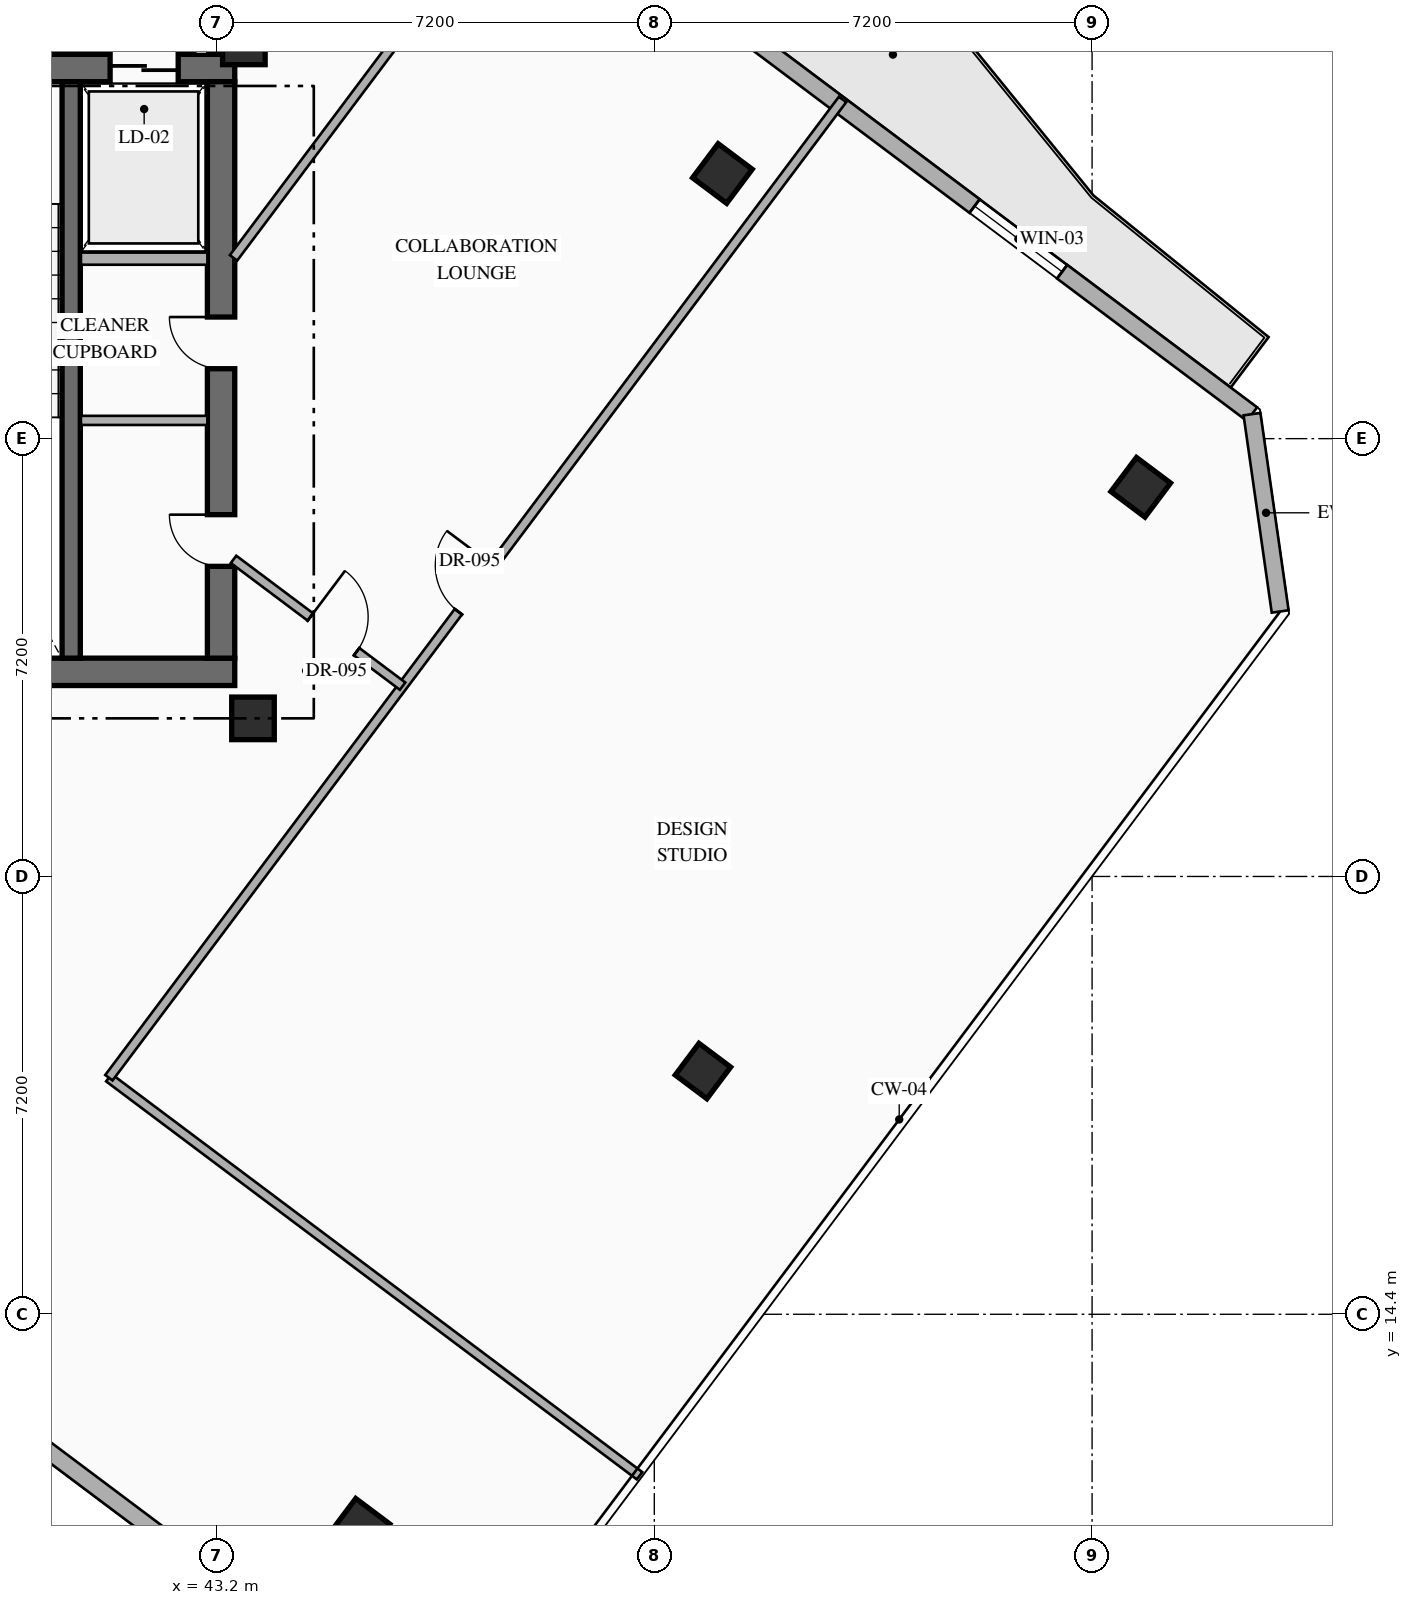
"""IFC4 building model, lengths in metres.
Left out: names, types, materials, properties, quantities, classifications, styles, units other than length and angle.
Written with IfcOpenShell. Run it as: python <this file> out.ifc"""

import sys

from ifc_helpers import new_model, si_unit, direction, frame, frame_2d, origin, origin_2d, place, context, subcontext, project, spatial, rectangle, hollow_rectangle, extrude, element, fill, save


model = new_model("IFC4")
c1 = context("Model", 3, precision=1e-05, world=origin(), true_north=direction((0.0, 1.0)))
c2 = subcontext(c1, "Body", "Model", "MODEL_VIEW")
j1 = project(units=[si_unit("LENGTHUNIT", "METRE"), si_unit("PLANEANGLEUNIT", "RADIAN")], contexts=[c1])
p1 = place(None, origin())
s1 = spatial("IfcSite", under=j1, at=p1, CompositionType="ELEMENT")
p2 = place(p1, origin())
s2 = spatial("IfcBuilding", under=s1, at=p2, CompositionType="ELEMENT")
p3 = place(p2, frame((0.0, 0.0, 220.35)))
s3 = spatial("IfcBuildingStorey", under=s2, at=p3, CompositionType="ELEMENT", Elevation=220.35)
p4 = place(p3, frame((36.04, 24.965, 0.0), z_axis=(0.0, 0.0, 1.0), x_axis=(1.0, 0.0, 0.0)))
e1 = element("IfcWall", 1, at=p4, inside=s3, PredefinedType="SHEAR", context=c2, shape_type="SweptSolid", body=[
    extrude(rectangle(XDim=7.46, YDim=0.45, at=frame_2d((3.73, 0.0))), origin(), (0.0, 0.0, 1.0), 3.6),
])
p5 = place(p3, frame((36.04, 34.895, 0.0), z_axis=(0.0, 0.0, 1.0), x_axis=(1.0, 0.0, 0.0)))
e2 = element("IfcWall", 2, at=p5, inside=s3, PredefinedType="SHEAR", context=c2, shape_type="SweptSolid", body=[
    extrude(rectangle(XDim=7.46, YDim=0.45, at=frame_2d((3.73, 0.0))), origin(), (0.0, 0.0, 1.0), 3.6),
])
p6 = place(p5, frame((2.51, 0.0, 0.0)))
e3 = element("IfcOpeningElement", 3, at=p6, cuts=e2, PredefinedType="OPENING", context=c2, shape_type="SweptSolid", body=[
    extrude(rectangle(XDim=1.1, YDim=2.2, at=frame_2d((0.55, 1.1))), frame((0.0, 0.235, 0.0), z_axis=(0.0, -1.0, 0.0), x_axis=(1.0, 0.0, 0.0)), (0.0, 0.0, 1.0), 0.47),
])
p7 = place(p5, frame((5.41, 0.0, 0.0)))
e4 = element("IfcOpeningElement", 4, at=p7, cuts=e2, PredefinedType="OPENING", context=c2, shape_type="SweptSolid", body=[
    extrude(rectangle(XDim=1.12, YDim=2.15, at=frame_2d((0.56, 1.075))), frame((0.0, 0.235, 0.0), z_axis=(0.0, -1.0, 0.0), x_axis=(1.0, 0.0, 0.0)), (0.0, 0.0, 1.0), 0.47),
])
p8 = place(p3, frame((43.275, 25.19, 0.0), z_axis=(0.0, 0.0, 1.0), x_axis=(0.0, 1.0, 0.0)))
e5 = element("IfcWall", 5, at=p8, inside=s3, PredefinedType="SHEAR", context=c2, shape_type="SweptSolid", body=[
    extrude(rectangle(XDim=9.48, YDim=0.45, at=frame_2d((4.74, 0.0))), origin(), (0.0, 0.0, 1.0), 3.6),
])
p9 = place(p8, frame((1.51, 0.0, 0.0)))
e6 = element("IfcOpeningElement", 6, at=p9, cuts=e5, PredefinedType="OPENING", context=c2, shape_type="SweptSolid", body=[
    extrude(rectangle(XDim=0.85, YDim=2.08, at=frame_2d((0.425, 1.04))), frame((0.0, 0.235, 0.0), z_axis=(0.0, -1.0, 0.0), x_axis=(1.0, 0.0, 0.0)), (0.0, 0.0, 1.0), 0.47),
])
p10 = place(p8, frame((4.76, 0.0, 0.0)))
e7 = element("IfcOpeningElement", 7, at=p10, cuts=e5, PredefinedType="OPENING", context=c2, shape_type="SweptSolid", body=[
    extrude(rectangle(XDim=0.85, YDim=2.08, at=frame_2d((0.425, 1.04))), frame((0.0, 0.235, 0.0), z_axis=(0.0, -1.0, 0.0), x_axis=(1.0, 0.0, 0.0)), (0.0, 0.0, 1.0), 0.47),
])
p11 = place(p3, frame((40.81, 25.19, 0.0), z_axis=(0.0, 0.0, 1.0), x_axis=(0.0, 1.0, 0.0)))
e8 = element("IfcWall", 8, at=p11, inside=s3, PredefinedType="SHEAR", context=c2, shape_type="SweptSolid", body=[
    extrude(rectangle(XDim=9.48, YDim=0.3, at=frame_2d((4.74, 0.0))), origin(), (0.0, 0.0, 1.0), 3.6),
])
for number, where, z_axis, x_axis in (
    (9, (43.8, 24.2, 0.0), (0.0, 0.0, 1.0), (1.0, 0.0, 0.0)),
    (10, (43.65, 35.3, 0.0), (0.0, 0.0, 1.0), (1.0, 0.0, 0.0)),
    (11, (51.52, 33.16, 0.0), (0.0, 0.0, 1.0), (0.8, -0.6, 0.0)),
    (12, (45.56, 10.88, 0.0), (0.0, 0.0, 1.0), (0.8, -0.6, 0.0)),
    (13, (58.4, 28.0, 0.0), (0.0, 0.0, 1.0), (0.8, -0.6, 0.0)),
):
    element("IfcColumn", number, at=place(p3, frame(where, z_axis=z_axis, x_axis=x_axis)), inside=s3, PredefinedType="COLUMN", context=c2, shape_type="SweptSolid", body=[
        extrude(hollow_rectangle(XDim=0.7, YDim=0.7, WallThickness=0.028, at=origin_2d()), origin(), (0.0, 0.0, 1.0), 3.6),
    ])
p12 = place(p3, frame((51.2, 18.4, 0.0), z_axis=(0.0, 0.0, 1.0), x_axis=(0.799999996291, -0.600000004945, 0.0)))
e14 = element("IfcColumn", 14, at=p12, inside=s3, PredefinedType="COLUMN", context=c2, shape_type="SweptSolid", body=[
    extrude(hollow_rectangle(XDim=0.65, YDim=0.65, WallThickness=0.025, at=origin_2d()), origin(), (0.0, 0.0, 1.0), 3.6),
])
p13 = place(p3, frame((44.86, 40.73, 0.0), z_axis=(0.0, 0.0, 1.0), x_axis=(0.800007624502, -0.599989833863, 0.0)))
e15 = element("IfcWall", 15, at=p13, inside=s3, PredefinedType="STANDARD", context=c2, shape_type="SweptSolid", body=[
    extrude(rectangle(XDim=19.212, YDim=0.28, at=frame_2d((9.606, 0.0))), origin(), (0.0, 0.0, 1.0), 3.35),
])
p14 = place(p13, frame((1.755, 0.0, 0.0)))
e16 = element("IfcOpeningElement", 16, at=p14, cuts=e15, PredefinedType="OPENING", context=c2, shape_type="SweptSolid", body=[
    extrude(rectangle(XDim=1.1, YDim=2.2, at=frame_2d((0.55, 1.1))), frame((0.0, 0.15, 0.0), z_axis=(0.0, -1.0, 0.0), x_axis=(1.0, 0.0, 0.0)), (0.0, 0.0, 1.0), 0.3),
])
p15 = place(p13, frame((13.509, 0.0, 0.85)))
e17 = element("IfcOpeningElement", 17, at=p15, cuts=e15, PredefinedType="OPENING", context=c2, shape_type="SweptSolid", body=[
    extrude(rectangle(XDim=1.8, YDim=2.1, at=frame_2d((0.9, 1.05))), frame((0.0, 0.15, 0.0), z_axis=(0.0, -1.0, 0.0), x_axis=(1.0, 0.0, 0.0)), (0.0, 0.0, 1.0), 0.3),
])
p16 = place(p3, frame((60.23, 29.203, 0.0), z_axis=(0.0, 0.0, 1.0), x_axis=(0.141296221922, -0.989967361922, 0.0)))
e18 = element("IfcWall", 18, at=p16, inside=s3, PredefinedType="STANDARD", context=c2, shape_type="SweptSolid", body=[
    extrude(rectangle(XDim=3.278, YDim=0.28, at=frame_2d((1.639, 0.0))), origin(), (0.0, 0.0, 1.0), 3.35),
])
p17 = place(p3, frame((44.918, 8.787, 0.0), z_axis=(0.0, 0.0, 1.0), x_axis=(-0.800004765927, 0.599993645378, 0.0)))
e19 = element("IfcWall", 19, at=p17, inside=s3, PredefinedType="STANDARD", context=c2, shape_type="SweptSolid", body=[
    extrude(rectangle(XDim=24.588, YDim=0.28, at=frame_2d((12.294, 0.0))), origin(), (0.0, 0.0, 1.0), 3.35),
])
p18 = place(p3, frame((40.97, 31.76, 0.0), z_axis=(0.0, 0.0, 1.0), x_axis=(1.0, 0.0, 0.0)))
e20 = element("IfcWall", 20, at=p18, inside=s3, PredefinedType="STANDARD", context=c2, shape_type="SweptSolid", body=[
    extrude(rectangle(XDim=2.08, YDim=0.2, at=frame_2d((1.04, 0.0))), origin(), (0.0, 0.0, 1.0), 3.35),
])
p19 = place(p3, frame((40.97, 29.1, 0.0), z_axis=(0.0, 0.0, 1.0), x_axis=(1.0, 0.0, 0.0)))
e21 = element("IfcWall", 21, at=p19, inside=s3, PredefinedType="PARTITIONING", context=c2, shape_type="SweptSolid", body=[
    extrude(rectangle(XDim=2.08, YDim=0.15, at=frame_2d((1.04, 0.0))), origin(), (0.0, 0.0, 1.0), 3.35),
])
p20 = place(p3, frame((42.95, 35.12, 0.0), z_axis=(0.0, 0.0, 1.0), x_axis=(0.0, 1.0, 0.0)))
e22 = element("IfcWall", 22, at=p20, inside=s3, PredefinedType="STANDARD", context=c2, shape_type="SweptSolid", body=[
    extrude(rectangle(XDim=2.98, YDim=0.2, at=frame_2d((1.49, 0.0))), origin(), (0.0, 0.0, 1.0), 3.35),
])
p21 = place(p3, frame((41.43, 18.29, 0.0), z_axis=(0.0, 0.0, 1.0), x_axis=(0.799994629375, -0.600007160767, 0.0)))
e23 = element("IfcWall", 23, at=p21, inside=s3, PredefinedType="PARTITIONING", context=c2, shape_type="SweptSolid", body=[
    extrude(rectangle(XDim=10.91, YDim=0.15, at=frame_2d((5.455, 0.0))), origin(), (0.0, 0.0, 1.0), 3.35),
])
p22 = place(p3, frame((41.43, 18.29, 0.0), z_axis=(0.0, 0.0, 1.0), x_axis=(0.600007769734, 0.79999417264, 0.0)))
e24 = element("IfcWall", 24, at=p22, inside=s3, PredefinedType="PARTITIONING", context=c2, shape_type="SweptSolid", body=[
    extrude(rectangle(XDim=20.11, YDim=0.15, at=frame_2d((10.055, 0.0))), origin(), (0.0, 0.0, 1.0), 3.35),
])
p23 = place(p22, frame((9.58, 0.0, 0.0)))
e25 = element("IfcOpeningElement", 25, at=p23, cuts=e24, PredefinedType="OPENING", context=c2, shape_type="SweptSolid", body=[
    extrude(rectangle(XDim=0.95, YDim=2.15, at=frame_2d((0.475, 1.075))), frame((0.0, 0.085, 0.0), z_axis=(0.0, -1.0, 0.0), x_axis=(1.0, 0.0, 0.0)), (0.0, 0.0, 1.0), 0.17),
])
p24 = place(p3, frame((43.48, 26.815, 0.0), z_axis=(0.0, 0.0, 1.0), x_axis=(0.800008430676, -0.599988758934, 0.0)))
e26 = element("IfcWall", 26, at=p24, inside=s3, PredefinedType="PARTITIONING", context=c2, shape_type="SweptSolid", body=[
    extrude(rectangle(XDim=3.475, YDim=0.15, at=frame_2d((1.738, 0.0))), origin(), (0.0, 0.0, 1.0), 3.35),
])
p25 = place(p24, frame((1.58, 0.0, 0.0)))
e27 = element("IfcOpeningElement", 27, at=p25, cuts=e26, PredefinedType="OPENING", context=c2, shape_type="SweptSolid", body=[
    extrude(rectangle(XDim=0.95, YDim=2.15, at=frame_2d((0.475, 1.075))), frame((0.0, 0.085, 0.0), z_axis=(0.0, -1.0, 0.0), x_axis=(1.0, 0.0, 0.0)), (0.0, 0.0, 1.0), 0.17),
])
p26 = place(p3, frame((43.48, 31.773, 0.0), z_axis=(0.0, 0.0, 1.0), x_axis=(0.599971041729, 0.800021717885, 0.0)))
e28 = element("IfcWall", 28, at=p26, inside=s3, PredefinedType="PARTITIONING", context=c2, shape_type="SweptSolid", body=[
    extrude(rectangle(XDim=8.094, YDim=0.15, at=frame_2d((4.047, 0.0))), origin(), (0.0, 0.0, 1.0), 3.35),
])
p27 = place(p15, origin())
e29 = element("IfcWindow", 29, at=p27, inside=s3, PartitioningType="SINGLE_PANEL", PredefinedType="WINDOW", context=c2, shape_type="SweptSolid", body=[
    extrude(rectangle(XDim=1.8, YDim=2.1, at=frame_2d((0.9, 1.05))), frame((0.0, 0.03, 0.0), z_axis=(0.0, -1.0, 0.0), x_axis=(1.0, 0.0, 0.0)), (0.0, 0.0, 1.0), 0.06),
])
fill(e17, e29)
p28 = place(p7, origin())
e30 = element("IfcDoor", 30, at=p28, inside=s3, OperationType="SLIDING_TO_RIGHT", PredefinedType="USERDEFINED", context=c2, shape_type="SweptSolid", body=[
    extrude(rectangle(XDim=1.12, YDim=2.15, at=frame_2d((0.56, 1.075))), frame((0.0, 0.025, 0.0), z_axis=(0.0, -1.0, 0.0), x_axis=(1.0, 0.0, 0.0)), (0.0, 0.0, 1.0), 0.05),
])
fill(e4, e30)
p29 = place(p9, origin())
e31 = element("IfcDoor", 31, at=p29, inside=s3, OperationType="SINGLE_SWING_RIGHT", PredefinedType="DOOR", context=c2, shape_type="SweptSolid", body=[
    extrude(rectangle(XDim=0.85, YDim=2.08, at=frame_2d((0.425, 1.04))), frame((0.0, 0.025, 0.0), z_axis=(0.0, -1.0, 0.0), x_axis=(1.0, 0.0, 0.0)), (0.0, 0.0, 1.0), 0.05),
])
fill(e6, e31)
p30 = place(p10, origin())
e32 = element("IfcDoor", 32, at=p30, inside=s3, OperationType="SINGLE_SWING_RIGHT", PredefinedType="DOOR", context=c2, shape_type="SweptSolid", body=[
    extrude(rectangle(XDim=0.85, YDim=2.08, at=frame_2d((0.425, 1.04))), frame((0.0, 0.025, 0.0), z_axis=(0.0, -1.0, 0.0), x_axis=(1.0, 0.0, 0.0)), (0.0, 0.0, 1.0), 0.05),
])
fill(e7, e32)
p31 = place(p23, origin())
e33 = element("IfcDoor", 33, at=p31, inside=s3, OperationType="SINGLE_SWING_RIGHT", PredefinedType="DOOR", context=c2, shape_type="SweptSolid", body=[
    extrude(rectangle(XDim=0.95, YDim=2.15, at=frame_2d((0.475, 1.075))), frame((0.0, 0.025, 0.0), z_axis=(0.0, -1.0, 0.0), x_axis=(1.0, 0.0, 0.0)), (0.0, 0.0, 1.0), 0.05),
])
fill(e25, e33)
p32 = place(p25, origin())
e34 = element("IfcDoor", 34, at=p32, inside=s3, OperationType="SINGLE_SWING_LEFT", PredefinedType="DOOR", context=c2, shape_type="SweptSolid", body=[
    extrude(rectangle(XDim=0.95, YDim=2.15, at=frame_2d((0.475, 1.075))), frame((0.0, 0.025, 0.0), z_axis=(0.0, -1.0, 0.0), x_axis=(1.0, 0.0, 0.0)), (0.0, 0.0, 1.0), 0.05),
])
fill(e27, e34)
save(model, sys.argv[1])
